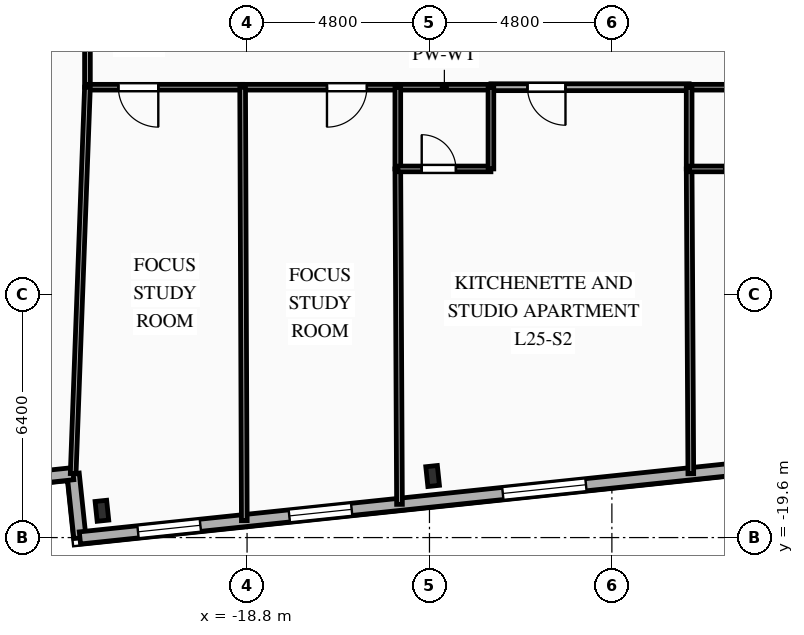
"""IFC4 building model, lengths in metres.
Left out: names, types, materials, properties, quantities, classifications, styles, units other than length and angle.
Written with IfcOpenShell. Run it as: python <this file> out.ifc"""

import sys

from ifc_helpers import new_model, si_unit, direction, frame, frame_2d, origin, origin_2d, place, context, subcontext, project, spatial, rectangle, i_section, extrude, element, fill, save


model = new_model("IFC4")
c1 = context("Model", 3, precision=1e-05, world=origin(), true_north=direction((0.0, 1.0)))
c2 = subcontext(c1, "Body", "Model", "MODEL_VIEW")
j1 = project(units=[si_unit("LENGTHUNIT", "METRE"), si_unit("PLANEANGLEUNIT", "RADIAN")], contexts=[c1])
p1 = place(None, origin())
s1 = spatial("IfcSite", under=j1, at=p1, CompositionType="ELEMENT")
p2 = place(p1, origin())
s2 = spatial("IfcBuilding", under=s1, at=p2, CompositionType="ELEMENT")
p3 = place(p2, frame((0.0, 0.0, 92.4)))
s3 = spatial("IfcBuildingStorey", under=s2, at=p3, CompositionType="ELEMENT", Elevation=92.4)
for number, where, z_axis, x_axis in (
    (1, (-22.619, -18.895, 0.0), (0.0, 0.0, 1.0), (0.995, 0.105, 0.0)),
    (2, (-13.917, -17.98, 0.0), (0.0, 0.0, 1.0), (0.995, 0.105, 0.0)),
):
    element("IfcColumn", number, at=place(p3, frame(where, z_axis=z_axis, x_axis=x_axis)), inside=s3, PredefinedType="COLUMN", context=c2, shape_type="SweptSolid", body=[
        extrude(i_section(OverallWidth=0.306, OverallDepth=0.524, WebThickness=0.021, FlangeThickness=0.04, FilletRadius=0.027, at=origin_2d()), origin(), (0.0, 0.0, 1.0), 3.35),
    ])
for number, where, z_axis, x_axis in (
    (3, (-23.198, -19.609, 0.0), (0.0, 0.0, 1.0), (-0.105, 0.995, 0.0)),
    (4, (-23.376, -17.919, 0.0), (0.0, 0.0, 1.0), (-0.995, -0.105, 0.0)),
):
    element("IfcWall", number, at=place(p3, frame(where, z_axis=z_axis, x_axis=x_axis)), inside=s3, PredefinedType="SOLIDWALL", context=c2, shape_type="SweptSolid", body=[
        extrude(rectangle(XDim=1.7, YDim=0.32, at=frame_2d((0.85, 0.0))), origin(), (0.0, 0.0, 1.0), 3.045),
    ])
p4 = place(p3, frame((30.307, -13.986, 0.0), z_axis=(0.0, 0.0, 1.0), x_axis=(-0.994521628355, -0.104531003701, 0.0)))
e5 = element("IfcWall", 5, at=p4, inside=s3, PredefinedType="SOLIDWALL", context=c2, shape_type="SweptSolid", body=[
    extrude(rectangle(XDim=53.8, YDim=0.32, at=frame_2d((26.9, 0.0))), origin(), (0.0, 0.0, 1.0), 3.045),
])
p5 = place(p4, frame((1.657, 0.0, 0.85)))
e6 = element("IfcOpeningElement", 6, at=p5, cuts=e5, PredefinedType="OPENING", context=c2, shape_type="SweptSolid", body=[
    extrude(rectangle(XDim=1.65, YDim=1.85, at=frame_2d((0.825, 0.925))), frame((0.0, 0.17, 0.0), z_axis=(0.0, -1.0, 0.0), x_axis=(1.0, 0.0, 0.0)), (0.0, 0.0, 1.0), 0.34),
])
p6 = place(p4, frame((5.099, 0.0, 0.85)))
e7 = element("IfcOpeningElement", 7, at=p6, cuts=e5, PredefinedType="OPENING", context=c2, shape_type="SweptSolid", body=[
    extrude(rectangle(XDim=1.65, YDim=1.85, at=frame_2d((0.825, 0.925))), frame((0.0, 0.17, 0.0), z_axis=(0.0, -1.0, 0.0), x_axis=(1.0, 0.0, 0.0)), (0.0, 0.0, 1.0), 0.34),
])
p7 = place(p4, frame((10.143, 0.0, 0.85)))
e8 = element("IfcOpeningElement", 8, at=p7, cuts=e5, PredefinedType="OPENING", context=c2, shape_type="SweptSolid", body=[
    extrude(rectangle(XDim=1.65, YDim=1.85, at=frame_2d((0.825, 0.925))), frame((0.0, 0.17, 0.0), z_axis=(0.0, -1.0, 0.0), x_axis=(1.0, 0.0, 0.0)), (0.0, 0.0, 1.0), 0.34),
])
p8 = place(p4, frame((17.314, 0.0, 0.85)))
e9 = element("IfcOpeningElement", 9, at=p8, cuts=e5, PredefinedType="OPENING", context=c2, shape_type="SweptSolid", body=[
    extrude(rectangle(XDim=2.2, YDim=1.85, at=frame_2d((1.1, 0.925))), frame((0.0, 0.17, 0.0), z_axis=(0.0, -1.0, 0.0), x_axis=(1.0, 0.0, 0.0)), (0.0, 0.0, 1.0), 0.34),
])
p9 = place(p4, frame((25.0, 0.0, 0.85)))
e10 = element("IfcOpeningElement", 10, at=p9, cuts=e5, PredefinedType="OPENING", context=c2, shape_type="SweptSolid", body=[
    extrude(rectangle(XDim=2.2, YDim=1.85, at=frame_2d((1.1, 0.925))), frame((0.0, 0.17, 0.0), z_axis=(0.0, -1.0, 0.0), x_axis=(1.0, 0.0, 0.0)), (0.0, 0.0, 1.0), 0.34),
])
p10 = place(p4, frame((32.685, 0.0, 0.85)))
e11 = element("IfcOpeningElement", 11, at=p10, cuts=e5, PredefinedType="OPENING", context=c2, shape_type="SweptSolid", body=[
    extrude(rectangle(XDim=2.2, YDim=1.85, at=frame_2d((1.1, 0.925))), frame((0.0, 0.17, 0.0), z_axis=(0.0, -1.0, 0.0), x_axis=(1.0, 0.0, 0.0)), (0.0, 0.0, 1.0), 0.34),
])
p11 = place(p4, frame((40.411, 0.0, 0.85)))
e12 = element("IfcOpeningElement", 12, at=p11, cuts=e5, PredefinedType="OPENING", context=c2, shape_type="SweptSolid", body=[
    extrude(rectangle(XDim=2.2, YDim=1.85, at=frame_2d((1.1, 0.925))), frame((0.0, 0.17, 0.0), z_axis=(0.0, -1.0, 0.0), x_axis=(1.0, 0.0, 0.0)), (0.0, 0.0, 1.0), 0.34),
])
p12 = place(p4, frame((46.61, 0.0, 0.85)))
e13 = element("IfcOpeningElement", 13, at=p12, cuts=e5, PredefinedType="OPENING", context=c2, shape_type="SweptSolid", body=[
    extrude(rectangle(XDim=1.65, YDim=1.85, at=frame_2d((0.825, 0.925))), frame((0.0, 0.17, 0.0), z_axis=(0.0, -1.0, 0.0), x_axis=(1.0, 0.0, 0.0)), (0.0, 0.0, 1.0), 0.34),
])
p13 = place(p4, frame((50.613, 0.0, 0.85)))
e14 = element("IfcOpeningElement", 14, at=p13, cuts=e5, PredefinedType="OPENING", context=c2, shape_type="SweptSolid", body=[
    extrude(rectangle(XDim=1.65, YDim=1.85, at=frame_2d((0.825, 0.925))), frame((0.0, 0.17, 0.0), z_axis=(0.0, -1.0, 0.0), x_axis=(1.0, 0.0, 0.0)), (0.0, 0.0, 1.0), 0.34),
])
p14 = place(p3, frame((-23.0, -7.75, 0.0), z_axis=(0.0, 0.0, 1.0), x_axis=(0.0, 1.0, 0.0)))
e15 = element("IfcWall", 15, at=p14, inside=s3, PredefinedType="PARTITIONING", context=c2, shape_type="SweptSolid", body=[
    extrude(rectangle(XDim=2.15, YDim=0.15, at=frame_2d((1.075, 0.0))), origin(), (0.0, 0.0, 1.0), 2.7),
])
p15 = place(p3, frame((-18.917, -7.75, 0.0), z_axis=(0.0, 0.0, 1.0), x_axis=(-1.0, 0.0, 0.0)))
e16 = element("IfcWall", 16, at=p15, inside=s3, PredefinedType="PARTITIONING", context=c2, shape_type="SweptSolid", body=[
    extrude(rectangle(XDim=4.083, YDim=0.15, at=frame_2d((2.042, 0.0))), origin(), (0.0, 0.0, 1.0), 3.045),
])
p16 = place(p15, frame((2.219, 0.0, 0.0)))
e17 = element("IfcOpeningElement", 17, at=p16, cuts=e16, PredefinedType="OPENING", context=c2, shape_type="SweptSolid", body=[
    extrude(rectangle(XDim=1.05, YDim=2.15, at=frame_2d((0.525, 1.075))), frame((0.0, 0.085, 0.0), z_axis=(0.0, -1.0, 0.0), x_axis=(1.0, 0.0, 0.0)), (0.0, 0.0, 1.0), 0.17),
])
p17 = place(p3, frame((-14.833, -7.75, 0.0), z_axis=(0.0, 0.0, 1.0), x_axis=(-1.0, 0.0, 0.0)))
e18 = element("IfcWall", 18, at=p17, inside=s3, PredefinedType="PARTITIONING", context=c2, shape_type="SweptSolid", body=[
    extrude(rectangle(XDim=4.083, YDim=0.15, at=frame_2d((2.042, 0.0))), origin(), (0.0, 0.0, 1.0), 3.045),
])
p18 = place(p17, frame((0.814, 0.0, 0.0)))
e19 = element("IfcOpeningElement", 19, at=p18, cuts=e18, PredefinedType="OPENING", context=c2, shape_type="SweptSolid", body=[
    extrude(rectangle(XDim=1.05, YDim=2.15, at=frame_2d((0.525, 1.075))), frame((0.0, 0.085, 0.0), z_axis=(0.0, -1.0, 0.0), x_axis=(1.0, 0.0, 0.0)), (0.0, 0.0, 1.0), 0.17),
])
p19 = place(p3, frame((-7.167, -7.75, 0.0), z_axis=(0.0, 0.0, 1.0), x_axis=(-1.0, 0.0, 0.0)))
e20 = element("IfcWall", 20, at=p19, inside=s3, PredefinedType="PARTITIONING", context=c2, shape_type="SweptSolid", body=[
    extrude(rectangle(XDim=5.216, YDim=0.18, at=frame_2d((2.608, 0.0))), origin(), (0.0, 0.0, 1.0), 3.045),
])
p20 = place(p19, frame((3.254, 0.0, 0.0)))
e21 = element("IfcOpeningElement", 21, at=p20, cuts=e20, PredefinedType="OPENING", context=c2, shape_type="SweptSolid", body=[
    extrude(rectangle(XDim=1.0, YDim=2.15, at=frame_2d((0.5, 1.075))), frame((0.0, 0.1, 0.0), z_axis=(0.0, -1.0, 0.0), x_axis=(1.0, 0.0, 0.0)), (0.0, 0.0, 1.0), 0.2),
])
for number, where, z_axis, x_axis in (
    (22, (-12.383, -7.75, 0.0), (0.0, 0.0, 1.0), (-1.0, 0.0, 0.0)),
    (23, (-4.717, -7.75, 0.0), (0.0, 0.0, 1.0), (-1.0, 0.0, 0.0)),
):
    element("IfcWall", number, at=place(p3, frame(where, z_axis=z_axis, x_axis=x_axis)), inside=s3, PredefinedType="PLUMBINGWALL", context=c2, shape_type="SweptSolid", body=[
        extrude(rectangle(XDim=2.45, YDim=0.15, at=frame_2d((1.225, 0.0))), origin(), (0.0, 0.0, 1.0), 3.045),
    ])
p21 = place(p3, frame((-23.0, -7.75, 0.0), z_axis=(0.0, 0.0, 1.0), x_axis=(-0.036924695214, -0.999318050914, 0.0)))
e24 = element("IfcWall", 24, at=p21, inside=s3, PredefinedType="PARTITIONING", context=c2, shape_type="SweptSolid", body=[
    extrude(rectangle(XDim=10.176, YDim=0.15, at=frame_2d((5.088, 0.0))), origin(), (0.0, 0.0, 1.0), 3.045),
])
p22 = place(p3, frame((-18.917, -7.75, 0.0), z_axis=(0.0, 0.0, 1.0), x_axis=(0.003853205971, -0.999992576374, 0.0)))
e25 = element("IfcWall", 25, at=p22, inside=s3, PredefinedType="PARTITIONING", context=c2, shape_type="SweptSolid", body=[
    extrude(rectangle(XDim=11.405, YDim=0.15, at=frame_2d((5.702, 0.0))), origin(), (0.0, 0.0, 1.0), 3.045),
])
p23 = place(p3, frame((-14.833, -9.9, 0.0), z_axis=(0.0, 0.0, 1.0), x_axis=(0.004979191388, -0.99998760375, 0.0)))
e26 = element("IfcWall", 26, at=p23, inside=s3, PredefinedType="PARTITIONING", context=c2, shape_type="SweptSolid", body=[
    extrude(rectangle(XDim=8.826, YDim=0.15, at=frame_2d((4.413, 0.0))), origin(), (0.0, 0.0, 1.0), 3.045),
])
p24 = place(p3, frame((-14.833, -7.75, 0.0), z_axis=(0.0, 0.0, 1.0), x_axis=(0.0, -1.0, 0.0)))
e27 = element("IfcWall", 27, at=p24, inside=s3, PredefinedType="PLUMBINGWALL", context=c2, shape_type="SweptSolid", body=[
    extrude(rectangle(XDim=2.15, YDim=0.15, at=frame_2d((1.075, 0.0))), origin(), (0.0, 0.0, 1.0), 3.045),
])
p25 = place(p3, frame((-14.833, -9.9, 0.0), z_axis=(0.0, 0.0, 1.0), x_axis=(1.0, 0.0, 0.0)))
e28 = element("IfcWall", 28, at=p25, inside=s3, PredefinedType="PLUMBINGWALL", context=c2, shape_type="SweptSolid", body=[
    extrude(rectangle(XDim=2.45, YDim=0.15, at=frame_2d((1.225, 0.0))), origin(), (0.0, 0.0, 1.0), 3.045),
])
p26 = place(p25, frame((0.629, 0.0, 0.0)))
e29 = element("IfcOpeningElement", 29, at=p26, cuts=e28, PredefinedType="OPENING", context=c2, shape_type="SweptSolid", body=[
    extrude(rectangle(XDim=0.9, YDim=2.1, at=frame_2d((0.45, 1.05))), frame((0.0, 0.085, 0.0), z_axis=(0.0, -1.0, 0.0), x_axis=(1.0, 0.0, 0.0)), (0.0, 0.0, 1.0), 0.17),
])
p27 = place(p3, frame((-12.383, -9.9, 0.0), z_axis=(0.0, 0.0, 1.0), x_axis=(0.0, 1.0, 0.0)))
e30 = element("IfcWall", 30, at=p27, inside=s3, PredefinedType="PLUMBINGWALL", context=c2, shape_type="SweptSolid", body=[
    extrude(rectangle(XDim=2.15, YDim=0.15, at=frame_2d((1.075, 0.0))), origin(), (0.0, 0.0, 1.0), 3.045),
])
p28 = place(p3, frame((-7.167, -9.9, 0.0), z_axis=(0.0, 0.0, 1.0), x_axis=(0.005479369798, -0.999984988141, 0.0)))
e31 = element("IfcWall", 31, at=p28, inside=s3, PredefinedType="PARTITIONING", context=c2, shape_type="SweptSolid", body=[
    extrude(rectangle(XDim=8.02, YDim=0.15, at=frame_2d((4.01, 0.0))), origin(), (0.0, 0.0, 1.0), 3.045),
])
p29 = place(p3, frame((-7.167, -7.75, 0.0), z_axis=(0.0, 0.0, 1.0), x_axis=(0.0, -1.0, 0.0)))
e32 = element("IfcWall", 32, at=p29, inside=s3, PredefinedType="PLUMBINGWALL", context=c2, shape_type="SweptSolid", body=[
    extrude(rectangle(XDim=2.15, YDim=0.15, at=frame_2d((1.075, 0.0))), origin(), (0.0, 0.0, 1.0), 3.045),
])
p30 = place(p3, frame((-7.167, -9.9, 0.0), z_axis=(0.0, 0.0, 1.0), x_axis=(1.0, 0.0, 0.0)))
e33 = element("IfcWall", 33, at=p30, inside=s3, PredefinedType="PLUMBINGWALL", context=c2, shape_type="SweptSolid", body=[
    extrude(rectangle(XDim=2.45, YDim=0.15, at=frame_2d((1.225, 0.0))), origin(), (0.0, 0.0, 1.0), 3.045),
])
p31 = place(p30, frame((0.921, 0.0, 0.0)))
e34 = element("IfcOpeningElement", 34, at=p31, cuts=e33, PredefinedType="OPENING", context=c2, shape_type="SweptSolid", body=[
    extrude(rectangle(XDim=0.9, YDim=2.1, at=frame_2d((0.45, 1.05))), frame((0.0, 0.085, 0.0), z_axis=(0.0, -1.0, 0.0), x_axis=(1.0, 0.0, 0.0)), (0.0, 0.0, 1.0), 0.17),
])
p32 = place(p11, origin())
e35 = element("IfcWindow", 35, at=p32, inside=s3, PartitioningType="SINGLE_PANEL", PredefinedType="WINDOW", context=c2, shape_type="SweptSolid", body=[
    extrude(rectangle(XDim=2.2, YDim=1.85, at=frame_2d((1.1, 0.925))), frame((0.0, 0.03, 0.0), z_axis=(0.0, -1.0, 0.0), x_axis=(1.0, 0.0, 0.0)), (0.0, 0.0, 1.0), 0.06),
])
fill(e12, e35)
p33 = place(p12, origin())
e36 = element("IfcWindow", 36, at=p33, inside=s3, PartitioningType="SINGLE_PANEL", PredefinedType="WINDOW", context=c2, shape_type="SweptSolid", body=[
    extrude(rectangle(XDim=1.65, YDim=1.85, at=frame_2d((0.825, 0.925))), frame((0.0, 0.03, 0.0), z_axis=(0.0, -1.0, 0.0), x_axis=(1.0, 0.0, 0.0)), (0.0, 0.0, 1.0), 0.06),
])
fill(e13, e36)
p34 = place(p13, origin())
e37 = element("IfcWindow", 37, at=p34, inside=s3, PartitioningType="SINGLE_PANEL", PredefinedType="WINDOW", context=c2, shape_type="SweptSolid", body=[
    extrude(rectangle(XDim=1.65, YDim=1.85, at=frame_2d((0.825, 0.925))), frame((0.0, 0.03, 0.0), z_axis=(0.0, -1.0, 0.0), x_axis=(1.0, 0.0, 0.0)), (0.0, 0.0, 1.0), 0.06),
])
fill(e14, e37)
p35 = place(p16, origin())
e38 = element("IfcDoor", 38, at=p35, inside=s3, OperationType="SINGLE_SWING_LEFT", PredefinedType="DOOR", context=c2, shape_type="SweptSolid", body=[
    extrude(rectangle(XDim=1.05, YDim=2.15, at=frame_2d((0.525, 1.075))), frame((0.0, 0.025, 0.0), z_axis=(0.0, -1.0, 0.0), x_axis=(1.0, 0.0, 0.0)), (0.0, 0.0, 1.0), 0.05),
])
fill(e17, e38)
p36 = place(p18, origin())
e39 = element("IfcDoor", 39, at=p36, inside=s3, OperationType="SINGLE_SWING_RIGHT", PredefinedType="DOOR", context=c2, shape_type="SweptSolid", body=[
    extrude(rectangle(XDim=1.05, YDim=2.15, at=frame_2d((0.525, 1.075))), frame((0.0, 0.025, 0.0), z_axis=(0.0, -1.0, 0.0), x_axis=(1.0, 0.0, 0.0)), (0.0, 0.0, 1.0), 0.05),
])
fill(e19, e39)
p37 = place(p20, origin())
e40 = element("IfcDoor", 40, at=p37, inside=s3, OperationType="SINGLE_SWING_LEFT", PredefinedType="DOOR", context=c2, shape_type="SweptSolid", body=[
    extrude(rectangle(XDim=1.0, YDim=2.15, at=frame_2d((0.5, 1.075))), frame((0.0, 0.025, 0.0), z_axis=(0.0, -1.0, 0.0), x_axis=(1.0, 0.0, 0.0)), (0.0, 0.0, 1.0), 0.05),
])
fill(e21, e40)
p38 = place(p26, origin())
e41 = element("IfcDoor", 41, at=p38, inside=s3, OperationType="SINGLE_SWING_LEFT", PredefinedType="DOOR", context=c2, shape_type="SweptSolid", body=[
    extrude(rectangle(XDim=0.9, YDim=2.1, at=frame_2d((0.45, 1.05))), frame((0.0, 0.025, 0.0), z_axis=(0.0, -1.0, 0.0), x_axis=(1.0, 0.0, 0.0)), (0.0, 0.0, 1.0), 0.05),
])
fill(e29, e41)
p39 = place(p31, origin())
e42 = element("IfcDoor", 42, at=p39, inside=s3, OperationType="SINGLE_SWING_RIGHT", PredefinedType="DOOR", context=c2, shape_type="SweptSolid", body=[
    extrude(rectangle(XDim=0.9, YDim=2.1, at=frame_2d((0.45, 1.05))), frame((0.0, 0.025, 0.0), z_axis=(0.0, -1.0, 0.0), x_axis=(1.0, 0.0, 0.0)), (0.0, 0.0, 1.0), 0.05),
])
fill(e34, e42)
save(model, sys.argv[1])
